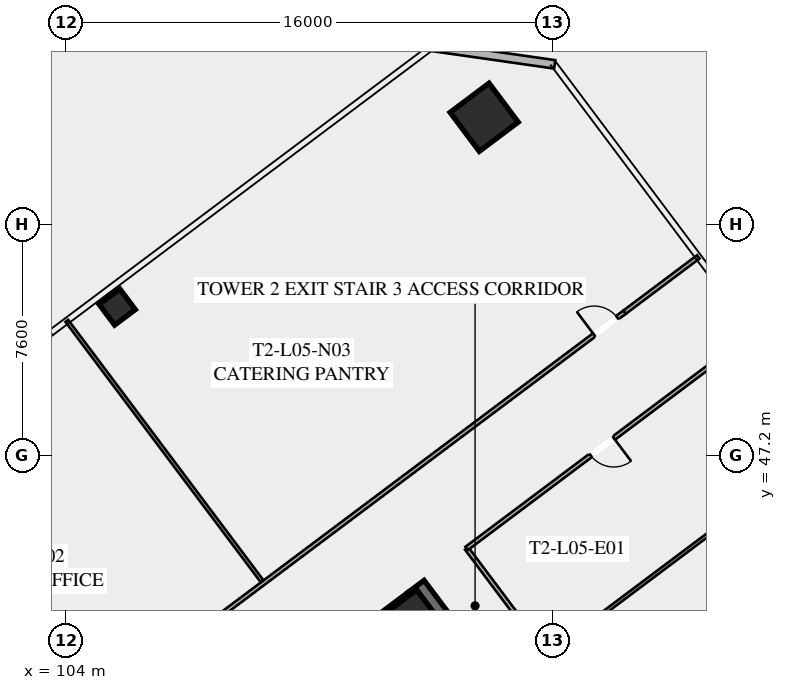
"""IFC4 building model, lengths in metres.
Left out: names, types, materials, properties, quantities, classifications, styles, units other than length and angle.
Written with IfcOpenShell. Run it as: python <this file> out.ifc"""

import sys

from ifc_helpers import new_model, si_unit, direction, frame, frame_2d, origin, origin_2d, place, context, subcontext, project, spatial, rectangle, hollow_rectangle, extrude, element, fill, save


model = new_model("IFC4")
c1 = context("Model", 3, precision=1e-05, world=origin(), true_north=direction((0.0, 1.0)))
c2 = subcontext(c1, "Body", "Model", "MODEL_VIEW")
j1 = project(units=[si_unit("LENGTHUNIT", "METRE"), si_unit("PLANEANGLEUNIT", "RADIAN")], contexts=[c1])
p1 = place(None, origin())
s1 = spatial("IfcSite", under=j1, at=p1, CompositionType="ELEMENT")
p2 = place(p1, origin())
s2 = spatial("IfcBuilding", under=s1, at=p2, CompositionType="ELEMENT")
p3 = place(p2, frame((0.0, 0.0, 24.6)))
s3 = spatial("IfcBuildingStorey", under=s2, at=p3, CompositionType="ELEMENT", Elevation=24.6)
p4 = place(p3, frame((115.524, 42.893, 0.0), z_axis=(0.0, 0.0, 1.0), x_axis=(0.600005007985, -0.799996243986, 0.0)))
e1 = element("IfcWall", 1, at=p4, inside=s3, PredefinedType="SHEAR", context=c2, shape_type="SweptSolid", body=[
    extrude(rectangle(XDim=15.6, YDim=0.65, at=frame_2d((7.8, 0.0))), origin(), (0.0, 0.0, 1.0), 3.55),
])
p5 = place(p3, frame((103.571, 33.522, 0.0), z_axis=(0.0, 0.0, 1.0), x_axis=(0.799998028465, 0.600002628705, 0.0)))
e2 = element("IfcWall", 2, at=p5, inside=s3, PredefinedType="SHEAR", context=c2, shape_type="SweptSolid", body=[
    extrude(rectangle(XDim=14.86, YDim=0.65, at=frame_2d((7.43, 0.0))), origin(), (0.0, 0.0, 1.0), 3.55),
])
p6 = place(p5, frame((4.48, 0.0, 0.0)))
e3 = element("IfcOpeningElement", 3, at=p6, cuts=e2, PredefinedType="OPENING", context=c2, shape_type="SweptSolid", body=[
    extrude(rectangle(XDim=1.25, YDim=2.25, at=frame_2d((0.625, 1.125))), frame((0.0, 0.335, 0.0), z_axis=(0.0, -1.0, 0.0), x_axis=(1.0, 0.0, 0.0)), (0.0, 0.0, 1.0), 0.67),
])
p7 = place(p5, frame((9.53, 0.0, 0.0)))
e4 = element("IfcOpeningElement", 4, at=p7, cuts=e2, PredefinedType="OPENING", context=c2, shape_type="SweptSolid", body=[
    extrude(rectangle(XDim=1.25, YDim=2.25, at=frame_2d((0.625, 1.125))), frame((0.0, 0.335, 0.0), z_axis=(0.0, -1.0, 0.0), x_axis=(1.0, 0.0, 0.0)), (0.0, 0.0, 1.0), 0.67),
])
p8 = place(p3, frame((115.41, 41.87, 0.0), z_axis=(0.0, 0.0, 1.0), x_axis=(0.799999996291, 0.600000004945, 0.0)))
e5 = element("IfcColumn", 5, at=p8, inside=s3, PredefinedType="COLUMN", context=c2, shape_type="SweptSolid", body=[
    extrude(hollow_rectangle(XDim=1.3, YDim=1.3, WallThickness=0.05, at=origin_2d()), origin(), (0.0, 0.0, 1.0), 3.35),
])
p9 = place(p3, frame((117.76, 58.32, 0.0), z_axis=(0.0, 0.0, 1.0), x_axis=(0.799999996291, 0.600000004945, 0.0)))
e6 = element("IfcColumn", 6, at=p9, inside=s3, PredefinedType="COLUMN", context=c2, shape_type="SweptSolid", body=[
    extrude(hollow_rectangle(XDim=1.6, YDim=1.6, WallThickness=0.06, at=origin_2d()), origin(), (0.0, 0.0, 1.0), 3.35),
])
p10 = place(p3, frame((105.69, 52.08, 0.0), z_axis=(0.0, 0.0, 1.0), x_axis=(0.799999996291, 0.600000004945, 0.0)))
e7 = element("IfcColumn", 7, at=p10, inside=s3, PredefinedType="COLUMN", context=c2, shape_type="SweptSolid", body=[
    extrude(hollow_rectangle(XDim=0.85, YDim=0.85, WallThickness=0.035, at=origin_2d()), origin(), (0.0, 0.0, 1.0), 3.35),
])
p11 = place(p3, frame((116.02, 60.64, 0.0), z_axis=(0.0, 0.0, 1.0), x_axis=(0.989955445613, -0.14137968631, 0.0)))
e8 = element("IfcWall", 8, at=p11, inside=s3, PredefinedType="SOLIDWALL", context=c2, shape_type="SweptSolid", body=[
    extrude(rectangle(XDim=4.101, YDim=0.28, at=frame_2d((2.051, 0.0))), origin(), (0.0, 0.0, 1.0), 3.35),
])
p12 = place(p3, frame((119.824, 40.618, 0.0), z_axis=(0.0, 0.0, 1.0), x_axis=(-0.599982243973, 0.800013316712, 0.0)))
e9 = element("IfcWall", 9, at=p12, inside=s3, PredefinedType="PARTITIONING", context=c2, shape_type="SweptSolid", body=[
    extrude(rectangle(XDim=4.4, YDim=0.135, at=frame_2d((2.2, 0.0))), origin(), (0.0, 0.0, 1.0), 2.703),
])
p13 = place(p3, frame((98.516, 34.012, 0.0), z_axis=(0.0, 0.0, 1.0), x_axis=(0.799998035726, 0.600002619023, 0.0)))
e10 = element("IfcWall", 10, at=p13, inside=s3, PredefinedType="PARTITIONING", context=c2, shape_type="SweptSolid", body=[
    extrude(rectangle(XDim=29.83, YDim=0.135, at=frame_2d((14.915, 0.0))), origin(), (0.0, 0.0, 1.0), 2.703),
])
p14 = place(p13, frame((0.3, 0.0, 0.0)))
e11 = element("IfcOpeningElement", 11, at=p14, cuts=e10, PredefinedType="OPENING", context=c2, shape_type="SweptSolid", body=[
    extrude(rectangle(XDim=0.95, YDim=2.05, at=frame_2d((0.475, 1.025))), frame((0.0, 0.077, 0.0), z_axis=(0.0, -1.0, 0.0), x_axis=(1.0, 0.0, 0.0)), (0.0, 0.0, 1.0), 0.155),
])
p15 = place(p13, frame((10.829, 0.0, 0.0)))
e12 = element("IfcOpeningElement", 12, at=p15, cuts=e10, PredefinedType="OPENING", context=c2, shape_type="SweptSolid", body=[
    extrude(rectangle(XDim=0.95, YDim=2.05, at=frame_2d((0.475, 1.025))), frame((0.0, 0.077, 0.0), z_axis=(0.0, -1.0, 0.0), x_axis=(1.0, 0.0, 0.0)), (0.0, 0.0, 1.0), 0.155),
])
p16 = place(p13, frame((28.58, 0.0, 0.0)))
e13 = element("IfcOpeningElement", 13, at=p16, cuts=e10, PredefinedType="OPENING", context=c2, shape_type="SweptSolid", body=[
    extrude(rectangle(XDim=0.95, YDim=2.05, at=frame_2d((0.475, 1.025))), frame((0.0, 0.077, 0.0), z_axis=(0.0, -1.0, 0.0), x_axis=(1.0, 0.0, 0.0)), (0.0, 0.0, 1.0), 0.155),
])
p17 = place(p3, frame((122.38, 51.91, 0.0), z_axis=(0.0, 0.0, 1.0), x_axis=(0.799990331366, 0.600012891296, 0.0)))
e14 = element("IfcWall", 14, at=p17, inside=s3, PredefinedType="PARTITIONING", context=c2, shape_type="SweptSolid", body=[
    extrude(rectangle(XDim=3.03, YDim=0.135, at=frame_2d((1.515, 0.0))), origin(), (0.0, 0.0, 1.0), 2.703),
])
p18 = place(p3, frame((110.452, 43.064, 0.0), z_axis=(0.0, 0.0, 1.0), x_axis=(-0.599992698573, 0.800005476018, 0.0)))
e15 = element("IfcWall", 15, at=p18, inside=s3, PredefinedType="PARTITIONING", context=c2, shape_type="SweptSolid", body=[
    extrude(rectangle(XDim=10.7, YDim=0.11, at=frame_2d((5.35, 0.0))), origin(), (0.0, 0.0, 1.0), 2.703),
])
p19 = place(p3, frame((126.664, 51.248, 0.0), z_axis=(0.0, 0.0, 1.0), x_axis=(-0.799995055373, -0.600006592779, 0.0)))
e16 = element("IfcWall", 16, at=p19, inside=s3, PredefinedType="PARTITIONING", context=c2, shape_type="SweptSolid", body=[
    extrude(rectangle(XDim=11.85, YDim=0.135, at=frame_2d((5.925, 0.0))), origin(), (0.0, 0.0, 1.0), 2.703),
])
p20 = place(p19, frame((5.8, 0.0, 0.0)))
e17 = element("IfcOpeningElement", 17, at=p20, cuts=e16, PredefinedType="OPENING", context=c2, shape_type="SweptSolid", body=[
    extrude(rectangle(XDim=0.95, YDim=2.05, at=frame_2d((0.475, 1.025))), frame((0.0, 0.077, 0.0), z_axis=(0.0, -1.0, 0.0), x_axis=(1.0, 0.0, 0.0)), (0.0, 0.0, 1.0), 0.155),
])
p21 = place(p3, frame((129.304, 47.728, 0.0), z_axis=(0.0, 0.0, 1.0), x_axis=(-0.8, -0.6, 0.0)))
e18 = element("IfcWall", 18, at=p21, inside=s3, PredefinedType="PARTITIONING", context=c2, shape_type="SweptSolid", body=[
    extrude(rectangle(XDim=10.0, YDim=0.11, at=frame_2d((5.0, 0.0))), origin(), (0.0, 0.0, 1.0), 2.703),
])
p22 = place(p16, origin())
e19 = element("IfcDoor", 19, at=p22, inside=s3, OperationType="SINGLE_SWING_LEFT", PredefinedType="DOOR", context=c2, shape_type="SweptSolid", body=[
    extrude(rectangle(XDim=0.95, YDim=2.05, at=frame_2d((0.475, 1.025))), frame((0.0, 0.025, 0.0), z_axis=(0.0, -1.0, 0.0), x_axis=(1.0, 0.0, 0.0)), (0.0, 0.0, 1.0), 0.05),
])
fill(e13, e19)
p23 = place(p20, origin())
e20 = element("IfcDoor", 20, at=p23, inside=s3, OperationType="SINGLE_SWING_LEFT", PredefinedType="DOOR", context=c2, shape_type="SweptSolid", body=[
    extrude(rectangle(XDim=0.95, YDim=2.05, at=frame_2d((0.475, 1.025))), frame((0.0, 0.025, 0.0), z_axis=(0.0, -1.0, 0.0), x_axis=(1.0, 0.0, 0.0)), (0.0, 0.0, 1.0), 0.05),
])
fill(e17, e20)
save(model, sys.argv[1])
